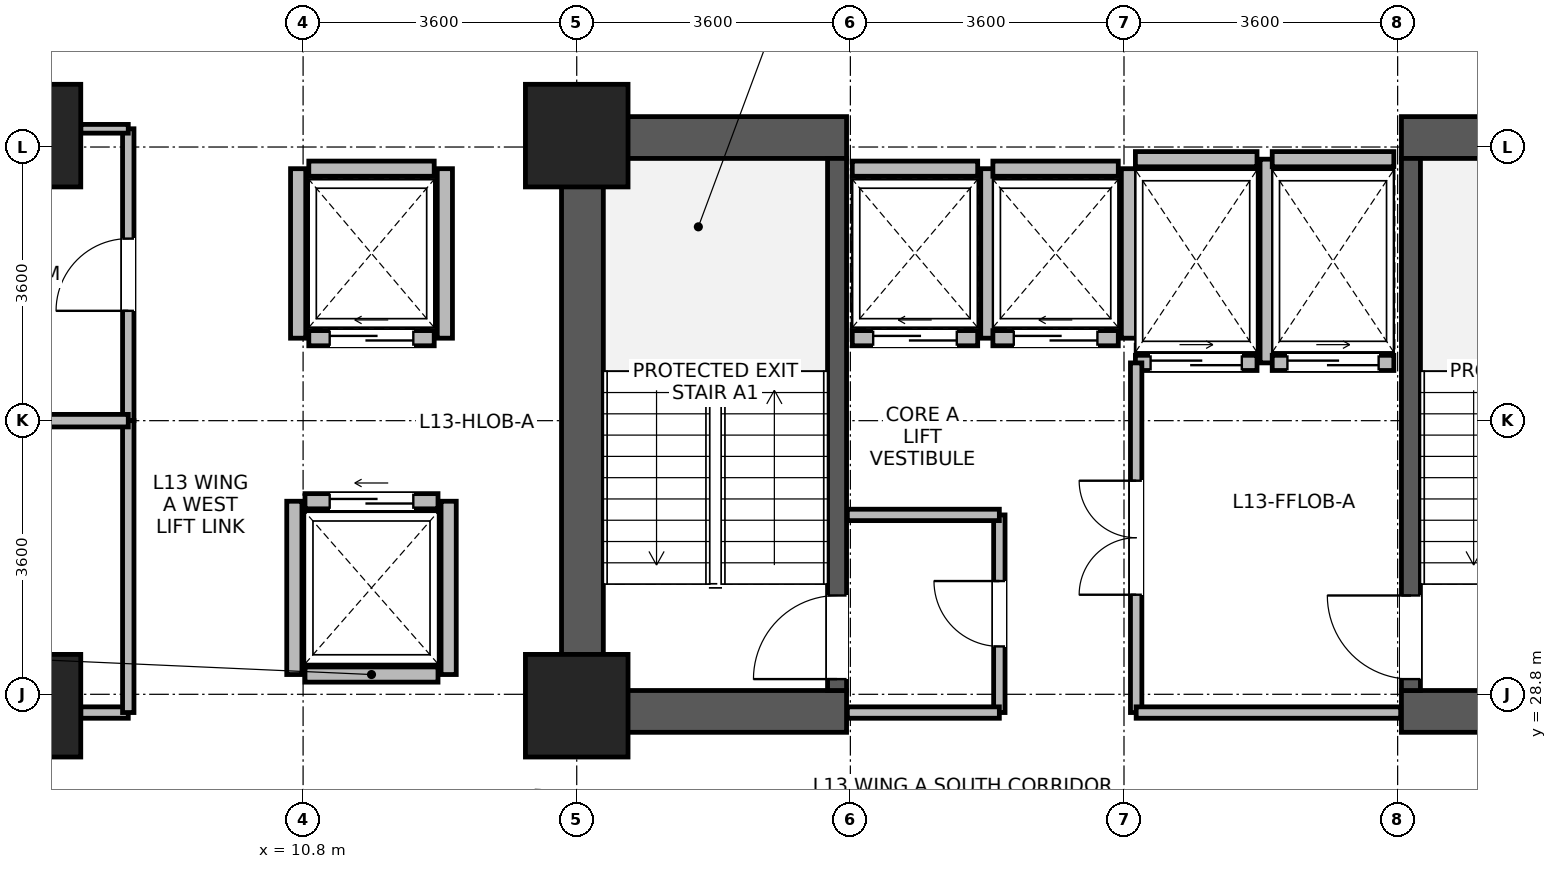
"""IFC4 building model, lengths in metres.
Left out: names, types, materials, properties, quantities, classifications, styles, units other than length and angle.
Written with IfcOpenShell. Run it as: python <this file> out.ifc"""

import sys

from ifc_helpers import new_model, si_unit, direction, frame, frame_2d, origin, origin_2d, place, context, subcontext, project, spatial, rectangle, extrude, source, transform, mapped, element, fill, save


model = new_model("IFC4")
c1 = context("Model", 3, precision=1e-05, world=origin(), true_north=direction((0.0, 1.0)))
c2 = subcontext(c1, "Body", "Model", "MODEL_VIEW")
j1 = project(units=[si_unit("LENGTHUNIT", "METRE"), si_unit("PLANEANGLEUNIT", "RADIAN")], contexts=[c1])
p1 = place(None, origin())
s1 = spatial("IfcSite", under=j1, at=p1, CompositionType="ELEMENT")
p2 = place(p1, origin())
s2 = spatial("IfcBuilding", under=s1, at=p2, CompositionType="ELEMENT")
p3 = place(p2, frame((0.0, 0.0, 54.9)))
s3 = spatial("IfcBuildingStorey", under=s2, at=p3, CompositionType="ELEMENT", Elevation=54.9)
p4 = place(p3, frame((14.475, 28.3, 0.0), z_axis=(0.0, 0.0, 1.0), x_axis=(0.0, 1.0, 0.0)))
e1 = element("IfcWall", 1, at=p4, inside=s3, PredefinedType="SHEAR", context=c2, shape_type="SweptSolid", body=[
    extrude(rectangle(XDim=8.1, YDim=0.55, at=frame_2d((4.05, 0.0))), origin(), (0.0, 0.0, 1.0), 3.45),
])
for number, where, z_axis, x_axis in (
    (2, (14.75, 28.575, 0.0), (0.0, 0.0, 1.0), (1.0, 0.0, 0.0)),
    (3, (25.25, 28.575, 0.0), (0.0, 0.0, 1.0), (1.0, 0.0, 0.0)),
    (4, (14.75, 36.125, 0.0), (0.0, 0.0, 1.0), (1.0, 0.0, 0.0)),
    (5, (25.25, 36.125, 0.0), (0.0, 0.0, 1.0), (1.0, 0.0, 0.0)),
):
    element("IfcWall", number, at=place(p3, frame(where, z_axis=z_axis, x_axis=x_axis)), inside=s3, PredefinedType="SHEAR", context=c2, shape_type="SweptSolid", body=[
        extrude(rectangle(XDim=3.2, YDim=0.55, at=frame_2d((1.6, 0.0))), origin(), (0.0, 0.0, 1.0), 3.45),
    ])
p5 = place(p3, frame((17.825, 28.85, 0.0), z_axis=(0.0, 0.0, 1.0), x_axis=(0.0, 1.0, 0.0)))
e6 = element("IfcWall", 6, at=p5, inside=s3, PredefinedType="SHEAR", context=c2, shape_type="SweptSolid", body=[
    extrude(rectangle(XDim=7.0, YDim=0.25, at=frame_2d((3.5, 0.0))), origin(), (0.0, 0.0, 1.0), 3.45),
])
p6 = place(p5, frame((0.15, 0.0, 0.0)))
e7 = element("IfcOpeningElement", 7, at=p6, cuts=e6, PredefinedType="OPENING", context=c2, shape_type="SweptSolid", body=[
    extrude(rectangle(XDim=1.1, YDim=2.08, at=frame_2d((0.55, 1.04))), frame((0.0, 0.135, 0.0), z_axis=(0.0, -1.0, 0.0), x_axis=(1.0, 0.0, 0.0)), (0.0, 0.0, 1.0), 0.27),
])
p7 = place(p3, frame((25.375, 28.85, 0.0), z_axis=(0.0, 0.0, 1.0), x_axis=(0.0, 1.0, 0.0)))
e8 = element("IfcWall", 8, at=p7, inside=s3, PredefinedType="SHEAR", context=c2, shape_type="SweptSolid", body=[
    extrude(rectangle(XDim=7.0, YDim=0.25, at=frame_2d((3.5, 0.0))), origin(), (0.0, 0.0, 1.0), 3.45),
])
p8 = place(p7, frame((0.15, 0.0, 0.0)))
e9 = element("IfcOpeningElement", 9, at=p8, cuts=e8, PredefinedType="OPENING", context=c2, shape_type="SweptSolid", body=[
    extrude(rectangle(XDim=1.1, YDim=2.08, at=frame_2d((0.55, 1.04))), frame((0.0, 0.135, 0.0), z_axis=(0.0, -1.0, 0.0), x_axis=(1.0, 0.0, 0.0)), (0.0, 0.0, 1.0), 0.27),
])
m1 = source(origin(), c2, "Body", "SweptSolid", [
    extrude(rectangle(XDim=1.35, YDim=1.35, at=origin_2d()), origin(), (0.0, 0.0, 1.0), 3.7),
])
for number, where, z_axis, x_axis in (
    (10, (7.2, 28.65, 0.0), (0.0, 0.0, 1.0), (1.0, 0.0, 0.0)),
    (11, (7.2, 36.15, 0.0), (0.0, 0.0, 1.0), (1.0, 0.0, 0.0)),
    (12, (14.4, 28.65, 0.0), (0.0, 0.0, 1.0), (1.0, 0.0, 0.0)),
    (13, (14.4, 36.15, 0.0), (0.0, 0.0, 1.0), (1.0, 0.0, 0.0)),
):
    element("IfcColumn", number, at=place(p3, frame(where, z_axis=z_axis, x_axis=x_axis)), inside=s3, PredefinedType="COLUMN", context=c2, shape_type="MappedRepresentation", body=[
        mapped(m1, transform((0.0, 0.0, 0.0), x_axis=(1.0, 0.0, 0.0), y_axis=(0.0, 1.0, 0.0), z_axis=(0.0, 0.0, 1.0), scale=1.0)),
    ])
p9 = place(p3, frame((18.025, 33.485, 0.0), z_axis=(0.0, 0.0, 1.0), x_axis=(1.0, 0.0, 0.0)))
e14 = element("IfcWall", 14, at=p9, inside=s3, PredefinedType="PARTITIONING", context=c2, shape_type="SweptSolid", body=[
    extrude(rectangle(XDim=1.65, YDim=0.2, at=frame_2d((0.825, 0.0))), origin(), (0.0, 0.0, 1.0), 3.43),
])
p10 = place(p9, frame((0.275, 0.0, 0.0)))
e15 = element("IfcOpeningElement", 15, at=p10, cuts=e14, PredefinedType="OPENING", context=c2, shape_type="SweptSolid", body=[
    extrude(rectangle(XDim=1.1, YDim=2.12, at=frame_2d((0.55, 1.06))), frame((0.0, 0.11, 0.0), z_axis=(0.0, -1.0, 0.0), x_axis=(1.0, 0.0, 0.0)), (0.0, 0.0, 1.0), 0.22),
])
p11 = place(p3, frame((18.025, 35.715, 0.0), z_axis=(0.0, 0.0, 1.0), x_axis=(1.0, 0.0, 0.0)))
e16 = element("IfcWall", 16, at=p11, inside=s3, PredefinedType="PARTITIONING", context=c2, shape_type="SweptSolid", body=[
    extrude(rectangle(XDim=1.65, YDim=0.2, at=frame_2d((0.825, 0.0))), origin(), (0.0, 0.0, 1.0), 2.23),
])
p12 = place(p3, frame((19.815, 33.485, 0.0), z_axis=(0.0, 0.0, 1.0), x_axis=(0.0, 1.0, 0.0)))
e17 = element("IfcWall", 17, at=p12, inside=s3, PredefinedType="PARTITIONING", context=c2, shape_type="SweptSolid", body=[
    extrude(rectangle(XDim=2.23, YDim=0.2, at=frame_2d((1.115, 0.0))), origin(), (0.0, 0.0, 1.0), 3.43),
])
p13 = place(p3, frame((19.875, 33.485, 0.0), z_axis=(0.0, 0.0, 1.0), x_axis=(1.0, 0.0, 0.0)))
e18 = element("IfcWall", 18, at=p13, inside=s3, PredefinedType="PARTITIONING", context=c2, shape_type="SweptSolid", body=[
    extrude(rectangle(XDim=1.65, YDim=0.2, at=frame_2d((0.825, 0.0))), origin(), (0.0, 0.0, 1.0), 3.43),
])
p14 = place(p13, frame((0.275, 0.0, 0.0)))
e19 = element("IfcOpeningElement", 19, at=p14, cuts=e18, PredefinedType="OPENING", context=c2, shape_type="SweptSolid", body=[
    extrude(rectangle(XDim=1.1, YDim=2.12, at=frame_2d((0.55, 1.06))), frame((0.0, 0.11, 0.0), z_axis=(0.0, -1.0, 0.0), x_axis=(1.0, 0.0, 0.0)), (0.0, 0.0, 1.0), 0.22),
])
p15 = place(p3, frame((19.875, 35.715, 0.0), z_axis=(0.0, 0.0, 1.0), x_axis=(1.0, 0.0, 0.0)))
e20 = element("IfcWall", 20, at=p15, inside=s3, PredefinedType="PARTITIONING", context=c2, shape_type="SweptSolid", body=[
    extrude(rectangle(XDim=1.65, YDim=0.2, at=frame_2d((0.825, 0.0))), origin(), (0.0, 0.0, 1.0), 2.23),
])
p16 = place(p3, frame((21.665, 33.485, 0.0), z_axis=(0.0, 0.0, 1.0), x_axis=(0.0, 1.0, 0.0)))
e21 = element("IfcWall", 21, at=p16, inside=s3, PredefinedType="PARTITIONING", context=c2, shape_type="SweptSolid", body=[
    extrude(rectangle(XDim=2.23, YDim=0.2, at=frame_2d((1.115, 0.0))), origin(), (0.0, 0.0, 1.0), 3.43),
])
p17 = place(p3, frame((10.825, 29.06, 0.0), z_axis=(0.0, 0.0, 1.0), x_axis=(1.0, 0.0, 0.0)))
e22 = element("IfcWall", 22, at=p17, inside=s3, PredefinedType="PARTITIONING", context=c2, shape_type="SweptSolid", body=[
    extrude(rectangle(XDim=1.75, YDim=0.2, at=frame_2d((0.875, 0.0))), origin(), (0.0, 0.0, 1.0), 3.43),
])
p18 = place(p3, frame((10.825, 31.34, 0.0), z_axis=(0.0, 0.0, 1.0), x_axis=(1.0, 0.0, 0.0)))
e23 = element("IfcWall", 23, at=p18, inside=s3, PredefinedType="PARTITIONING", context=c2, shape_type="SweptSolid", body=[
    extrude(rectangle(XDim=1.75, YDim=0.2, at=frame_2d((0.875, 0.0))), origin(), (0.0, 0.0, 1.0), 3.43),
])
p19 = place(p18, frame((0.325, 0.0, 0.0)))
e24 = element("IfcOpeningElement", 24, at=p19, cuts=e23, PredefinedType="OPENING", context=c2, shape_type="SweptSolid", body=[
    extrude(rectangle(XDim=1.1, YDim=2.12, at=frame_2d((0.55, 1.06))), frame((0.0, 0.11, 0.0), z_axis=(0.0, -1.0, 0.0), x_axis=(1.0, 0.0, 0.0)), (0.0, 0.0, 1.0), 0.22),
])
for number, where, z_axis, x_axis in (
    (25, (10.685, 29.06, 0.0), (0.0, 0.0, 1.0), (0.0, 1.0, 0.0)),
    (26, (12.715, 29.06, 0.0), (0.0, 0.0, 1.0), (0.0, 1.0, 0.0)),
):
    element("IfcWall", number, at=place(p3, frame(where, z_axis=z_axis, x_axis=x_axis)), inside=s3, PredefinedType="PARTITIONING", context=c2, shape_type="SweptSolid", body=[
        extrude(rectangle(XDim=2.28, YDim=0.2, at=frame_2d((1.14, 0.0))), origin(), (0.0, 0.0, 1.0), 3.43),
    ])
p20 = place(p3, frame((10.875, 33.485, 0.0), z_axis=(0.0, 0.0, 1.0), x_axis=(1.0, 0.0, 0.0)))
e27 = element("IfcWall", 27, at=p20, inside=s3, PredefinedType="PARTITIONING", context=c2, shape_type="SweptSolid", body=[
    extrude(rectangle(XDim=1.65, YDim=0.2, at=frame_2d((0.825, 0.0))), origin(), (0.0, 0.0, 1.0), 3.43),
])
p21 = place(p20, frame((0.275, 0.0, 0.0)))
e28 = element("IfcOpeningElement", 28, at=p21, cuts=e27, PredefinedType="OPENING", context=c2, shape_type="SweptSolid", body=[
    extrude(rectangle(XDim=1.1, YDim=2.12, at=frame_2d((0.55, 1.06))), frame((0.0, 0.11, 0.0), z_axis=(0.0, -1.0, 0.0), x_axis=(1.0, 0.0, 0.0)), (0.0, 0.0, 1.0), 0.22),
])
p22 = place(p3, frame((10.875, 35.715, 0.0), z_axis=(0.0, 0.0, 1.0), x_axis=(1.0, 0.0, 0.0)))
e29 = element("IfcWall", 29, at=p22, inside=s3, PredefinedType="PARTITIONING", context=c2, shape_type="SweptSolid", body=[
    extrude(rectangle(XDim=1.65, YDim=0.2, at=frame_2d((0.825, 0.0))), origin(), (0.0, 0.0, 1.0), 3.43),
])
for number, where, z_axis, x_axis in (
    (30, (10.735, 33.485, 0.0), (0.0, 0.0, 1.0), (0.0, 1.0, 0.0)),
    (31, (12.665, 33.485, 0.0), (0.0, 0.0, 1.0), (0.0, 1.0, 0.0)),
):
    element("IfcWall", number, at=place(p3, frame(where, z_axis=z_axis, x_axis=x_axis)), inside=s3, PredefinedType="PARTITIONING", context=c2, shape_type="SweptSolid", body=[
        extrude(rectangle(XDim=2.23, YDim=0.2, at=frame_2d((1.115, 0.0))), origin(), (0.0, 0.0, 1.0), 3.43),
    ])
p23 = place(p3, frame((21.75, 33.16, 0.0), z_axis=(0.0, 0.0, 1.0), x_axis=(1.0, 0.0, 0.0)))
e32 = element("IfcWall", 32, at=p23, inside=s3, PredefinedType="PARTITIONING", context=c2, shape_type="SweptSolid", body=[
    extrude(rectangle(XDim=1.6, YDim=0.2, at=frame_2d((0.8, 0.0))), origin(), (0.0, 0.0, 1.0), 3.43),
])
p24 = place(p23, frame((0.2, 0.0, 0.0)))
e33 = element("IfcOpeningElement", 33, at=p24, cuts=e32, PredefinedType="OPENING", context=c2, shape_type="SweptSolid", body=[
    extrude(rectangle(XDim=1.2, YDim=2.12, at=frame_2d((0.6, 1.06))), frame((0.0, 0.11, 0.0), z_axis=(0.0, -1.0, 0.0), x_axis=(1.0, 0.0, 0.0)), (0.0, 0.0, 1.0), 0.22),
])
p25 = place(p3, frame((21.75, 35.84, 0.0), z_axis=(0.0, 0.0, 1.0), x_axis=(1.0, 0.0, 0.0)))
e34 = element("IfcWall", 34, at=p25, inside=s3, PredefinedType="PARTITIONING", context=c2, shape_type="SweptSolid", body=[
    extrude(rectangle(XDim=1.6, YDim=0.2, at=frame_2d((0.8, 0.0))), origin(), (0.0, 0.0, 1.0), 2.23),
])
p26 = place(p3, frame((23.49, 33.16, 0.0), z_axis=(0.0, 0.0, 1.0), x_axis=(0.0, 1.0, 0.0)))
e35 = element("IfcWall", 35, at=p26, inside=s3, PredefinedType="PARTITIONING", context=c2, shape_type="SweptSolid", body=[
    extrude(rectangle(XDim=2.68, YDim=0.2, at=frame_2d((1.34, 0.0))), origin(), (0.0, 0.0, 1.0), 3.43),
])
p27 = place(p3, frame((23.55, 33.16, 0.0), z_axis=(0.0, 0.0, 1.0), x_axis=(1.0, 0.0, 0.0)))
e36 = element("IfcWall", 36, at=p27, inside=s3, PredefinedType="PARTITIONING", context=c2, shape_type="SweptSolid", body=[
    extrude(rectangle(XDim=1.6, YDim=0.2, at=frame_2d((0.8, 0.0))), origin(), (0.0, 0.0, 1.0), 3.43),
])
p28 = place(p27, frame((0.2, 0.0, 0.0)))
e37 = element("IfcOpeningElement", 37, at=p28, cuts=e36, PredefinedType="OPENING", context=c2, shape_type="SweptSolid", body=[
    extrude(rectangle(XDim=1.2, YDim=2.12, at=frame_2d((0.6, 1.06))), frame((0.0, 0.11, 0.0), z_axis=(0.0, -1.0, 0.0), x_axis=(1.0, 0.0, 0.0)), (0.0, 0.0, 1.0), 0.22),
])
p29 = place(p3, frame((23.55, 35.84, 0.0), z_axis=(0.0, 0.0, 1.0), x_axis=(1.0, 0.0, 0.0)))
e38 = element("IfcWall", 38, at=p29, inside=s3, PredefinedType="PARTITIONING", context=c2, shape_type="SweptSolid", body=[
    extrude(rectangle(XDim=1.6, YDim=0.2, at=frame_2d((0.8, 0.0))), origin(), (0.0, 0.0, 1.0), 2.23),
])
p30 = place(p3, frame((7.875, 28.56, 0.0), z_axis=(0.0, 0.0, 1.0), x_axis=(1.0, 0.0, 0.0)))
e39 = element("IfcWall", 39, at=p30, inside=s3, PredefinedType="PARTITIONING", context=c2, shape_type="SweptSolid", body=[
    extrude(rectangle(XDim=0.625, YDim=0.15, at=frame_2d((0.312, 0.0))), origin(), (0.0, 0.0, 1.0), 2.78),
])
p31 = place(p3, frame((8.5, 32.4, 0.0), z_axis=(0.0, 0.0, 1.0), x_axis=(0.0, 1.0, 0.0)))
e40 = element("IfcWall", 40, at=p31, inside=s3, PredefinedType="PARTITIONING", context=c2, shape_type="SweptSolid", body=[
    extrude(rectangle(XDim=3.84, YDim=0.15, at=frame_2d((1.92, 0.0))), origin(), (0.0, 0.0, 1.0), 3.43),
])
p32 = place(p31, frame((1.445, 0.0, 0.0)))
e41 = element("IfcOpeningElement", 41, at=p32, cuts=e40, PredefinedType="OPENING", context=c2, shape_type="SweptSolid", body=[
    extrude(rectangle(XDim=0.95, YDim=2.1, at=frame_2d((0.475, 1.05))), frame((0.0, 0.085, 0.0), z_axis=(0.0, -1.0, 0.0), x_axis=(1.0, 0.0, 0.0)), (0.0, 0.0, 1.0), 0.17),
])
p33 = place(p3, frame((8.5, 28.56, 0.0), z_axis=(0.0, 0.0, 1.0), x_axis=(0.0, 1.0, 0.0)))
e42 = element("IfcWall", 42, at=p33, inside=s3, PredefinedType="PARTITIONING", context=c2, shape_type="SweptSolid", body=[
    extrude(rectangle(XDim=3.84, YDim=0.15, at=frame_2d((1.92, 0.0))), origin(), (0.0, 0.0, 1.0), 3.43),
])
p34 = place(p3, frame((19.96, 28.56, 0.0), z_axis=(0.0, 0.0, 1.0), x_axis=(0.0, 1.0, 0.0)))
e43 = element("IfcWall", 43, at=p34, inside=s3, PredefinedType="PARTITIONING", context=c2, shape_type="SweptSolid", body=[
    extrude(rectangle(XDim=2.6, YDim=0.15, at=frame_2d((1.3, 0.0))), origin(), (0.0, 0.0, 1.0), 3.43),
])
p35 = place(p34, frame((0.87, 0.0, 0.0)))
e44 = element("IfcOpeningElement", 44, at=p35, cuts=e43, PredefinedType="OPENING", context=c2, shape_type="SweptSolid", body=[
    extrude(rectangle(XDim=0.86, YDim=2.02, at=frame_2d((0.43, 1.01))), frame((0.0, 0.085, 0.0), z_axis=(0.0, -1.0, 0.0), x_axis=(1.0, 0.0, 0.0)), (0.0, 0.0, 1.0), 0.17),
])
p36 = place(p3, frame((17.96, 28.56, 0.0), z_axis=(0.0, 0.0, 1.0), x_axis=(1.0, 0.0, 0.0)))
e45 = element("IfcWall", 45, at=p36, inside=s3, PredefinedType="PARTITIONING", context=c2, shape_type="SweptSolid", body=[
    extrude(rectangle(XDim=2.0, YDim=0.15, at=frame_2d((1.0, 0.0))), origin(), (0.0, 0.0, 1.0), 2.23),
])
p37 = place(p3, frame((17.96, 31.16, 0.0), z_axis=(0.0, 0.0, 1.0), x_axis=(1.0, 0.0, 0.0)))
e46 = element("IfcWall", 46, at=p37, inside=s3, PredefinedType="PARTITIONING", context=c2, shape_type="SweptSolid", body=[
    extrude(rectangle(XDim=2.0, YDim=0.15, at=frame_2d((1.0, 0.0))), origin(), (0.0, 0.0, 1.0), 3.43),
])
p38 = place(p3, frame((3.732, 32.4, 0.0), z_axis=(0.0, 0.0, 1.0), x_axis=(1.0, 0.0, 0.0)))
e47 = element("IfcWall", 47, at=p38, inside=s3, PredefinedType="PARTITIONING", context=c2, shape_type="SweptSolid", body=[
    extrude(rectangle(XDim=4.768, YDim=0.165, at=frame_2d((2.384, 0.0))), origin(), (0.0, 0.0, 1.0), 3.43),
])
p39 = place(p3, frame((7.875, 36.24, 0.0), z_axis=(0.0, 0.0, 1.0), x_axis=(1.0, 0.0, 0.0)))
e48 = element("IfcWall", 48, at=p39, inside=s3, PredefinedType="PARTITIONING", context=c2, shape_type="SweptSolid", body=[
    extrude(rectangle(XDim=0.625, YDim=0.115, at=frame_2d((0.312, 0.0))), origin(), (0.0, 0.0, 1.0), 2.78),
])
p40 = place(p3, frame((21.76, 28.56, 0.0), z_axis=(0.0, 0.0, 1.0), x_axis=(0.0, 1.0, 0.0)))
e49 = element("IfcWall", 49, at=p40, inside=s3, PredefinedType="PARTITIONING", context=c2, shape_type="SweptSolid", body=[
    extrude(rectangle(XDim=4.6, YDim=0.15, at=frame_2d((2.3, 0.0))), origin(), (0.0, 0.0, 1.0), 3.43),
])
p41 = place(p40, frame((1.55, 0.0, 0.0)))
e50 = element("IfcOpeningElement", 50, at=p41, cuts=e49, PredefinedType="OPENING", context=c2, shape_type="SweptSolid", body=[
    extrude(rectangle(XDim=1.5, YDim=2.1, at=frame_2d((0.75, 1.05))), frame((0.0, 0.085, 0.0), z_axis=(0.0, -1.0, 0.0), x_axis=(1.0, 0.0, 0.0)), (0.0, 0.0, 1.0), 0.17),
])
p42 = place(p3, frame((21.76, 28.56, 0.0), z_axis=(0.0, 0.0, 1.0), x_axis=(1.0, 0.0, 0.0)))
e51 = element("IfcWall", 51, at=p42, inside=s3, PredefinedType="PARTITIONING", context=c2, shape_type="SweptSolid", body=[
    extrude(rectangle(XDim=3.48, YDim=0.15, at=frame_2d((1.74, 0.0))), origin(), (0.0, 0.0, 1.0), 2.23),
])
p43 = place(p6, origin())
e52 = element("IfcDoor", 52, at=p43, inside=s3, OperationType="SINGLE_SWING_LEFT", PredefinedType="DOOR", context=c2, shape_type="SweptSolid", body=[
    extrude(rectangle(XDim=1.1, YDim=2.08, at=frame_2d((0.55, 1.04))), frame((0.0, 0.025, 0.0), z_axis=(0.0, -1.0, 0.0), x_axis=(1.0, 0.0, 0.0)), (0.0, 0.0, 1.0), 0.05),
])
fill(e7, e52)
p44 = place(p8, origin())
e53 = element("IfcDoor", 53, at=p44, inside=s3, OperationType="SINGLE_SWING_RIGHT", PredefinedType="DOOR", context=c2, shape_type="SweptSolid", body=[
    extrude(rectangle(XDim=1.1, YDim=2.08, at=frame_2d((0.55, 1.04))), frame((0.0, 0.025, 0.0), z_axis=(0.0, -1.0, 0.0), x_axis=(1.0, 0.0, 0.0)), (0.0, 0.0, 1.0), 0.05),
])
fill(e9, e53)
p45 = place(p10, origin())
e54 = element("IfcDoor", 54, at=p45, inside=s3, OperationType="SLIDING_TO_LEFT", PredefinedType="DOOR", context=c2, shape_type="SweptSolid", body=[
    extrude(rectangle(XDim=1.1, YDim=2.12, at=frame_2d((0.55, 1.06))), frame((0.0, 0.025, 0.0), z_axis=(0.0, -1.0, 0.0), x_axis=(1.0, 0.0, 0.0)), (0.0, 0.0, 1.0), 0.05),
])
fill(e15, e54)
p46 = place(p14, origin())
e55 = element("IfcDoor", 55, at=p46, inside=s3, OperationType="SLIDING_TO_LEFT", PredefinedType="DOOR", context=c2, shape_type="SweptSolid", body=[
    extrude(rectangle(XDim=1.1, YDim=2.12, at=frame_2d((0.55, 1.06))), frame((0.0, 0.025, 0.0), z_axis=(0.0, -1.0, 0.0), x_axis=(1.0, 0.0, 0.0)), (0.0, 0.0, 1.0), 0.05),
])
fill(e19, e55)
p47 = place(p19, origin())
e56 = element("IfcDoor", 56, at=p47, inside=s3, OperationType="SLIDING_TO_LEFT", PredefinedType="DOOR", context=c2, shape_type="SweptSolid", body=[
    extrude(rectangle(XDim=1.1, YDim=2.12, at=frame_2d((0.55, 1.06))), frame((0.0, 0.025, 0.0), z_axis=(0.0, -1.0, 0.0), x_axis=(1.0, 0.0, 0.0)), (0.0, 0.0, 1.0), 0.05),
])
fill(e24, e56)
p48 = place(p21, origin())
e57 = element("IfcDoor", 57, at=p48, inside=s3, OperationType="SLIDING_TO_LEFT", PredefinedType="DOOR", context=c2, shape_type="SweptSolid", body=[
    extrude(rectangle(XDim=1.1, YDim=2.12, at=frame_2d((0.55, 1.06))), frame((0.0, 0.025, 0.0), z_axis=(0.0, -1.0, 0.0), x_axis=(1.0, 0.0, 0.0)), (0.0, 0.0, 1.0), 0.05),
])
fill(e28, e57)
p49 = place(p24, origin())
e58 = element("IfcDoor", 58, at=p49, inside=s3, OperationType="SLIDING_TO_RIGHT", PredefinedType="DOOR", context=c2, shape_type="SweptSolid", body=[
    extrude(rectangle(XDim=1.2, YDim=2.12, at=frame_2d((0.6, 1.06))), frame((0.0, 0.025, 0.0), z_axis=(0.0, -1.0, 0.0), x_axis=(1.0, 0.0, 0.0)), (0.0, 0.0, 1.0), 0.05),
])
fill(e33, e58)
p50 = place(p28, origin())
e59 = element("IfcDoor", 59, at=p50, inside=s3, OperationType="SLIDING_TO_RIGHT", PredefinedType="DOOR", context=c2, shape_type="SweptSolid", body=[
    extrude(rectangle(XDim=1.2, YDim=2.12, at=frame_2d((0.6, 1.06))), frame((0.0, 0.025, 0.0), z_axis=(0.0, -1.0, 0.0), x_axis=(1.0, 0.0, 0.0)), (0.0, 0.0, 1.0), 0.05),
])
fill(e37, e59)
p51 = place(p32, origin())
e60 = element("IfcDoor", 60, at=p51, inside=s3, OperationType="SINGLE_SWING_LEFT", PredefinedType="DOOR", context=c2, shape_type="SweptSolid", body=[
    extrude(rectangle(XDim=0.95, YDim=2.1, at=frame_2d((0.475, 1.05))), frame((0.0, 0.025, 0.0), z_axis=(0.0, -1.0, 0.0), x_axis=(1.0, 0.0, 0.0)), (0.0, 0.0, 1.0), 0.05),
])
fill(e41, e60)
p52 = place(p35, origin())
e61 = element("IfcDoor", 61, at=p52, inside=s3, OperationType="SINGLE_SWING_RIGHT", PredefinedType="DOOR", context=c2, shape_type="SweptSolid", body=[
    extrude(rectangle(XDim=0.86, YDim=2.02, at=frame_2d((0.43, 1.01))), frame((0.0, 0.025, 0.0), z_axis=(0.0, -1.0, 0.0), x_axis=(1.0, 0.0, 0.0)), (0.0, 0.0, 1.0), 0.05),
])
fill(e44, e61)
p53 = place(p41, origin())
e62 = element("IfcDoor", 62, at=p53, inside=s3, OperationType="DOUBLE_DOOR_SINGLE_SWING", PredefinedType="DOOR", context=c2, shape_type="SweptSolid", body=[
    extrude(rectangle(XDim=1.5, YDim=2.1, at=frame_2d((0.75, 1.05))), frame((0.0, 0.025, 0.0), z_axis=(0.0, -1.0, 0.0), x_axis=(1.0, 0.0, 0.0)), (0.0, 0.0, 1.0), 0.05),
])
fill(e50, e62)
save(model, sys.argv[1])
